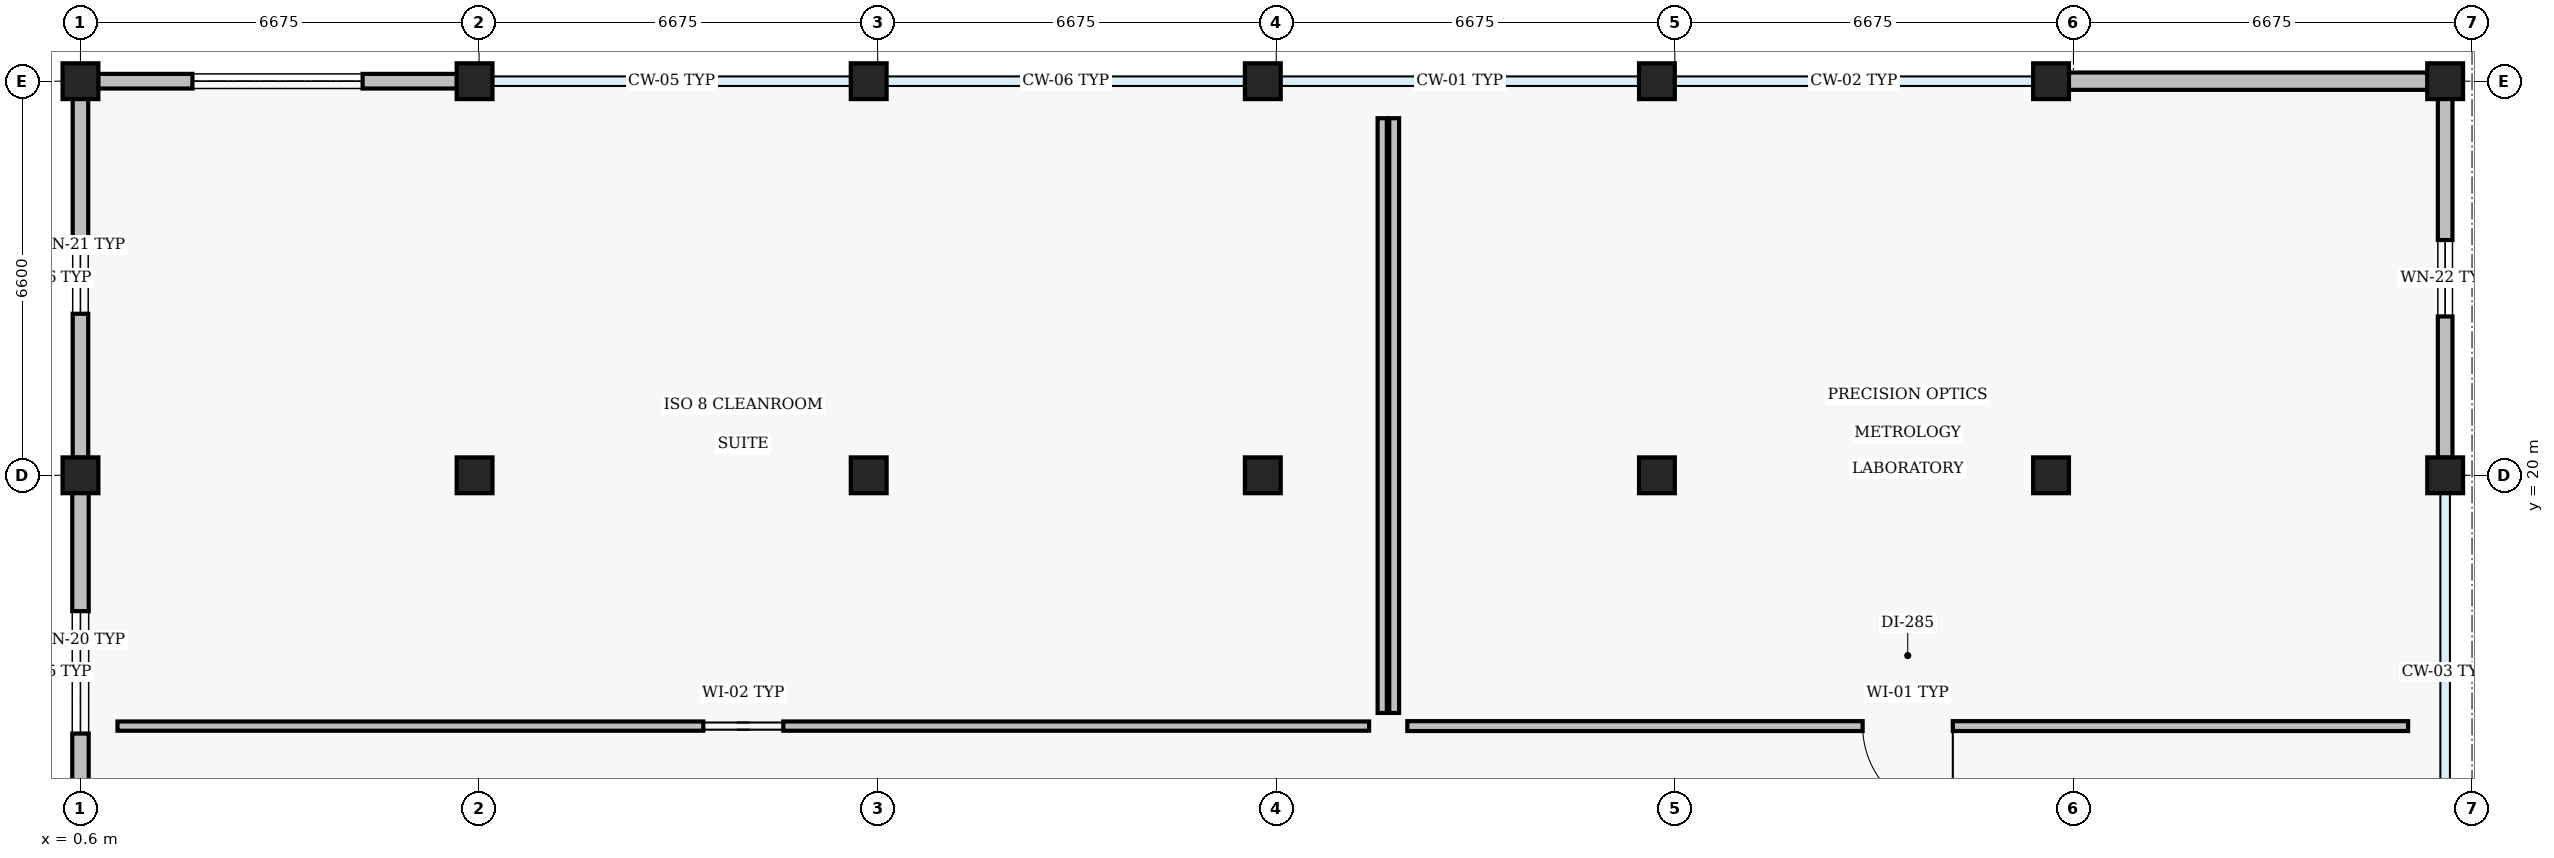
"""IFC4 building model, lengths in metres.
Left out: names, types, materials, properties, quantities, classifications, styles, units other than length and angle.
Written with IfcOpenShell. Run it as: python <this file> out.ifc"""

import sys

from ifc_helpers import new_model, si_unit, direction, frame, frame_2d, origin, origin_2d, place, context, subcontext, project, spatial, rectangle, extrude, element, fill, save


model = new_model("IFC4")
c1 = context("Model", 3, precision=1e-05, world=origin(), true_north=direction((0.0, 1.0)))
c2 = subcontext(c1, "Body", "Model", "MODEL_VIEW")
j1 = project(units=[si_unit("LENGTHUNIT", "METRE"), si_unit("PLANEANGLEUNIT", "RADIAN")], contexts=[c1])
p1 = place(None, origin())
s1 = spatial("IfcSite", under=j1, at=p1, CompositionType="ELEMENT")
p2 = place(p1, origin())
s2 = spatial("IfcBuilding", under=s1, at=p2, CompositionType="ELEMENT")
p3 = place(p2, frame((0.0, 0.0, 9.6)))
s3 = spatial("IfcBuildingStorey", under=s2, at=p3, CompositionType="ELEMENT", Elevation=9.6)
for number, where, z_axis, x_axis in (
    (1, (0.6, 20.0, 0.0), (0.0, 0.0, 1.0), (1.0, 0.0, 0.0)),
    (2, (0.6, 26.6, 0.0), (0.0, 0.0, 1.0), (1.0, 0.0, 0.0)),
    (3, (7.2, 20.0, 0.0), (0.0, 0.0, 1.0), (1.0, 0.0, 0.0)),
    (4, (7.2, 26.6, 0.0), (0.0, 0.0, 1.0), (1.0, 0.0, 0.0)),
    (5, (13.8, 20.0, 0.0), (0.0, 0.0, 1.0), (1.0, 0.0, 0.0)),
    (6, (13.8, 26.6, 0.0), (0.0, 0.0, 1.0), (1.0, 0.0, 0.0)),
    (7, (20.4, 20.0, 0.0), (0.0, 0.0, 1.0), (1.0, 0.0, 0.0)),
    (8, (20.4, 26.6, 0.0), (0.0, 0.0, 1.0), (1.0, 0.0, 0.0)),
    (9, (27.0, 20.0, 0.0), (0.0, 0.0, 1.0), (1.0, 0.0, 0.0)),
    (10, (27.0, 26.6, 0.0), (0.0, 0.0, 1.0), (1.0, 0.0, 0.0)),
    (11, (33.6, 20.0, 0.0), (0.0, 0.0, 1.0), (1.0, 0.0, 0.0)),
    (12, (33.6, 26.6, 0.0), (0.0, 0.0, 1.0), (1.0, 0.0, 0.0)),
    (13, (40.2, 20.0, 0.0), (0.0, 0.0, 1.0), (1.0, 0.0, 0.0)),
    (14, (40.2, 26.6, 0.0), (0.0, 0.0, 1.0), (1.0, 0.0, 0.0)),
):
    element("IfcColumn", number, at=place(p3, frame(where, z_axis=z_axis, x_axis=x_axis)), inside=s3, PredefinedType="COLUMN", context=c2, shape_type="SweptSolid", body=[
        extrude(rectangle(XDim=0.6, YDim=0.6, at=origin_2d()), origin(), (0.0, 0.0, 1.0), 4.28),
    ])
p4 = place(p3, frame((0.6, 13.695, 0.0), z_axis=(0.0, 0.0, 1.0), x_axis=(0.0, 1.0, 0.0)))
e15 = element("IfcWall", 15, at=p4, inside=s3, PredefinedType="STANDARD", context=c2, shape_type="SweptSolid", body=[
    extrude(rectangle(XDim=6.01, YDim=0.275, at=frame_2d((3.005, 0.0))), origin(), (0.0, 0.0, 1.0), 3.815),
])
p5 = place(p4, frame((1.98, 0.0, 0.95)))
e16 = element("IfcOpeningElement", 16, at=p5, cuts=e15, PredefinedType="OPENING", context=c2, shape_type="SweptSolid", body=[
    extrude(rectangle(XDim=2.05, YDim=1.7, at=frame_2d((1.025, 0.85))), frame((0.0, 0.137, 0.0), z_axis=(0.0, -1.0, 0.0), x_axis=(1.0, 0.0, 0.0)), (0.0, 0.0, 1.0), 0.275),
])
p6 = place(p3, frame((0.6, 20.295, 0.0), z_axis=(0.0, 0.0, 1.0), x_axis=(0.0, 1.0, 0.0)))
e17 = element("IfcWall", 17, at=p6, inside=s3, PredefinedType="STANDARD", context=c2, shape_type="SweptSolid", body=[
    extrude(rectangle(XDim=6.01, YDim=0.26, at=frame_2d((3.005, 0.0))), origin(), (0.0, 0.0, 1.0), 3.815),
])
p7 = place(p6, frame((2.41, 0.0, 0.95)))
e18 = element("IfcOpeningElement", 18, at=p7, cuts=e17, PredefinedType="OPENING", context=c2, shape_type="SweptSolid", body=[
    extrude(rectangle(XDim=1.19, YDim=1.38, at=frame_2d((0.595, 0.69))), frame((0.0, 0.13, 0.0), z_axis=(0.0, -1.0, 0.0), x_axis=(1.0, 0.0, 0.0)), (0.0, 0.0, 1.0), 0.26),
])
p8 = place(p3, frame((0.895, 26.6, 0.0), z_axis=(0.0, 0.0, 1.0), x_axis=(1.0, 0.0, 0.0)))
e19 = element("IfcWall", 19, at=p8, inside=s3, PredefinedType="STANDARD", context=c2, shape_type="SweptSolid", body=[
    extrude(rectangle(XDim=6.01, YDim=0.245, at=frame_2d((3.005, 0.0))), origin(), (0.0, 0.0, 1.0), 3.815),
])
p9 = place(p8, frame((1.58, 0.0, 0.95)))
e20 = element("IfcOpeningElement", 20, at=p9, cuts=e19, PredefinedType="OPENING", context=c2, shape_type="SweptSolid", body=[
    extrude(rectangle(XDim=2.85, YDim=1.5, at=frame_2d((1.425, 0.75))), frame((0.0, 0.123, 0.0), z_axis=(0.0, -1.0, 0.0), x_axis=(1.0, 0.0, 0.0)), (0.0, 0.0, 1.0), 0.245),
])
p10 = place(p3, frame((33.895, 26.6, 0.0), z_axis=(0.0, 0.0, 1.0), x_axis=(1.0, 0.0, 0.0)))
e21 = element("IfcWall", 21, at=p10, inside=s3, PredefinedType="STANDARD", context=c2, shape_type="SweptSolid", body=[
    extrude(rectangle(XDim=6.01, YDim=0.29, at=frame_2d((3.005, 0.0))), origin(), (0.0, 0.0, 1.0), 3.815),
])
p11 = place(p3, frame((40.2, 26.305, 0.0), z_axis=(0.0, 0.0, 1.0), x_axis=(0.0, -1.0, 0.0)))
e22 = element("IfcWall", 22, at=p11, inside=s3, PredefinedType="STANDARD", context=c2, shape_type="SweptSolid", body=[
    extrude(rectangle(XDim=6.01, YDim=0.245, at=frame_2d((3.005, 0.0))), origin(), (0.0, 0.0, 1.0), 3.815),
])
p12 = place(p11, frame((2.365, 0.0, 0.95)))
e23 = element("IfcOpeningElement", 23, at=p12, cuts=e22, PredefinedType="OPENING", context=c2, shape_type="SweptSolid", body=[
    extrude(rectangle(XDim=1.28, YDim=1.4, at=frame_2d((0.64, 0.7))), frame((0.0, 0.123, 0.0), z_axis=(0.0, -1.0, 0.0), x_axis=(1.0, 0.0, 0.0)), (0.0, 0.0, 1.0), 0.245),
])
p13 = place(p3, frame((1.22, 15.8, 0.0), z_axis=(0.0, 0.0, 1.0), x_axis=(1.0, 0.0, 0.0)))
e24 = element("IfcWall", 24, at=p13, inside=s3, PredefinedType="PARTITIONING", context=c2, shape_type="SweptSolid", body=[
    extrude(rectangle(XDim=20.96, YDim=0.155, at=frame_2d((10.48, 0.0))), origin(), (0.0, 0.0, 1.0), 3.815),
])
p14 = place(p13, frame((9.81, 0.0, 0.0)))
e25 = element("IfcOpeningElement", 25, at=p14, cuts=e24, PredefinedType="OPENING", context=c2, shape_type="SweptSolid", body=[
    extrude(rectangle(XDim=1.34, YDim=2.2, at=frame_2d((0.67, 1.1))), frame((0.0, 0.078, 0.0), z_axis=(0.0, -1.0, 0.0), x_axis=(1.0, 0.0, 0.0)), (0.0, 0.0, 1.0), 0.155),
])
p15 = place(p3, frame((22.4, 16.02, 0.0), z_axis=(0.0, 0.0, 1.0), x_axis=(0.0, 1.0, 0.0)))
e26 = element("IfcWall", 26, at=p15, inside=s3, PredefinedType="PARTITIONING", context=c2, shape_type="SweptSolid", body=[
    extrude(rectangle(XDim=9.96, YDim=0.155, at=frame_2d((4.98, 0.0))), origin(), (0.0, 0.0, 1.0), 3.95),
])
p16 = place(p3, frame((22.82, 15.8, 0.0), z_axis=(0.0, 0.0, 1.0), x_axis=(1.0, 0.0, 0.0)))
e27 = element("IfcWall", 27, at=p16, inside=s3, PredefinedType="PARTITIONING", context=c2, shape_type="SweptSolid", body=[
    extrude(rectangle(XDim=16.76, YDim=0.165, at=frame_2d((8.38, 0.0))), origin(), (0.0, 0.0, 1.0), 3.815),
])
p17 = place(p16, frame((7.625, 0.0, 0.0)))
e28 = element("IfcOpeningElement", 28, at=p17, cuts=e27, PredefinedType="OPENING", context=c2, shape_type="SweptSolid", body=[
    extrude(rectangle(XDim=1.51, YDim=2.12, at=frame_2d((0.755, 1.06))), frame((0.0, 0.083, 0.0), z_axis=(0.0, -1.0, 0.0), x_axis=(1.0, 0.0, 0.0)), (0.0, 0.0, 1.0), 0.165),
])
p18 = place(p3, frame((22.6, 25.98, 0.0), z_axis=(0.0, 0.0, 1.0), x_axis=(0.0, -1.0, 0.0)))
e29 = element("IfcWall", 29, at=p18, inside=s3, PredefinedType="PARTITIONING", context=c2, shape_type="SweptSolid", body=[
    extrude(rectangle(XDim=9.96, YDim=0.165, at=frame_2d((4.98, 0.0))), origin(), (0.0, 0.0, 1.0), 3.95),
])
p19 = place(p5, origin())
e30 = element("IfcWindow", 30, at=p19, inside=s3, PartitioningType="SINGLE_PANEL", PredefinedType="WINDOW", context=c2, shape_type="SweptSolid", body=[
    extrude(rectangle(XDim=2.05, YDim=1.7, at=frame_2d((1.025, 0.85))), frame((0.0, 0.03, 0.0), z_axis=(0.0, -1.0, 0.0), x_axis=(1.0, 0.0, 0.0)), (0.0, 0.0, 1.0), 0.06),
])
fill(e16, e30)
p20 = place(p7, origin())
e31 = element("IfcWindow", 31, at=p20, inside=s3, PartitioningType="SINGLE_PANEL", PredefinedType="WINDOW", context=c2, shape_type="SweptSolid", body=[
    extrude(rectangle(XDim=1.19, YDim=1.38, at=frame_2d((0.595, 0.69))), frame((0.0, 0.03, 0.0), z_axis=(0.0, -1.0, 0.0), x_axis=(1.0, 0.0, 0.0)), (0.0, 0.0, 1.0), 0.06),
])
fill(e18, e31)
p21 = place(p9, origin())
e32 = element("IfcWindow", 32, at=p21, inside=s3, PartitioningType="SINGLE_PANEL", PredefinedType="WINDOW", context=c2, shape_type="SweptSolid", body=[
    extrude(rectangle(XDim=2.85, YDim=1.5, at=frame_2d((1.425, 0.75))), frame((0.0, 0.03, 0.0), z_axis=(0.0, -1.0, 0.0), x_axis=(1.0, 0.0, 0.0)), (0.0, 0.0, 1.0), 0.06),
])
fill(e20, e32)
p22 = place(p12, origin())
e33 = element("IfcWindow", 33, at=p22, inside=s3, PartitioningType="SINGLE_PANEL", PredefinedType="WINDOW", context=c2, shape_type="SweptSolid", body=[
    extrude(rectangle(XDim=1.28, YDim=1.4, at=frame_2d((0.64, 0.7))), frame((0.0, 0.03, 0.0), z_axis=(0.0, -1.0, 0.0), x_axis=(1.0, 0.0, 0.0)), (0.0, 0.0, 1.0), 0.06),
])
fill(e23, e33)
p23 = place(p14, origin())
e34 = element("IfcDoor", 34, at=p23, inside=s3, OperationType="SLIDING_TO_RIGHT", PredefinedType="DOOR", context=c2, shape_type="SweptSolid", body=[
    extrude(rectangle(XDim=1.34, YDim=2.2, at=frame_2d((0.67, 1.1))), frame((0.0, 0.025, 0.0), z_axis=(0.0, -1.0, 0.0), x_axis=(1.0, 0.0, 0.0)), (0.0, 0.0, 1.0), 0.05),
])
fill(e25, e34)
p24 = place(p17, origin())
e35 = element("IfcDoor", 35, at=p24, inside=s3, OperationType="SINGLE_SWING_RIGHT", PredefinedType="DOOR", context=c2, shape_type="SweptSolid", body=[
    extrude(rectangle(XDim=1.51, YDim=2.12, at=frame_2d((0.755, 1.06))), frame((0.0, 0.025, 0.0), z_axis=(0.0, -1.0, 0.0), x_axis=(1.0, 0.0, 0.0)), (0.0, 0.0, 1.0), 0.05),
])
fill(e28, e35)
save(model, sys.argv[1])
